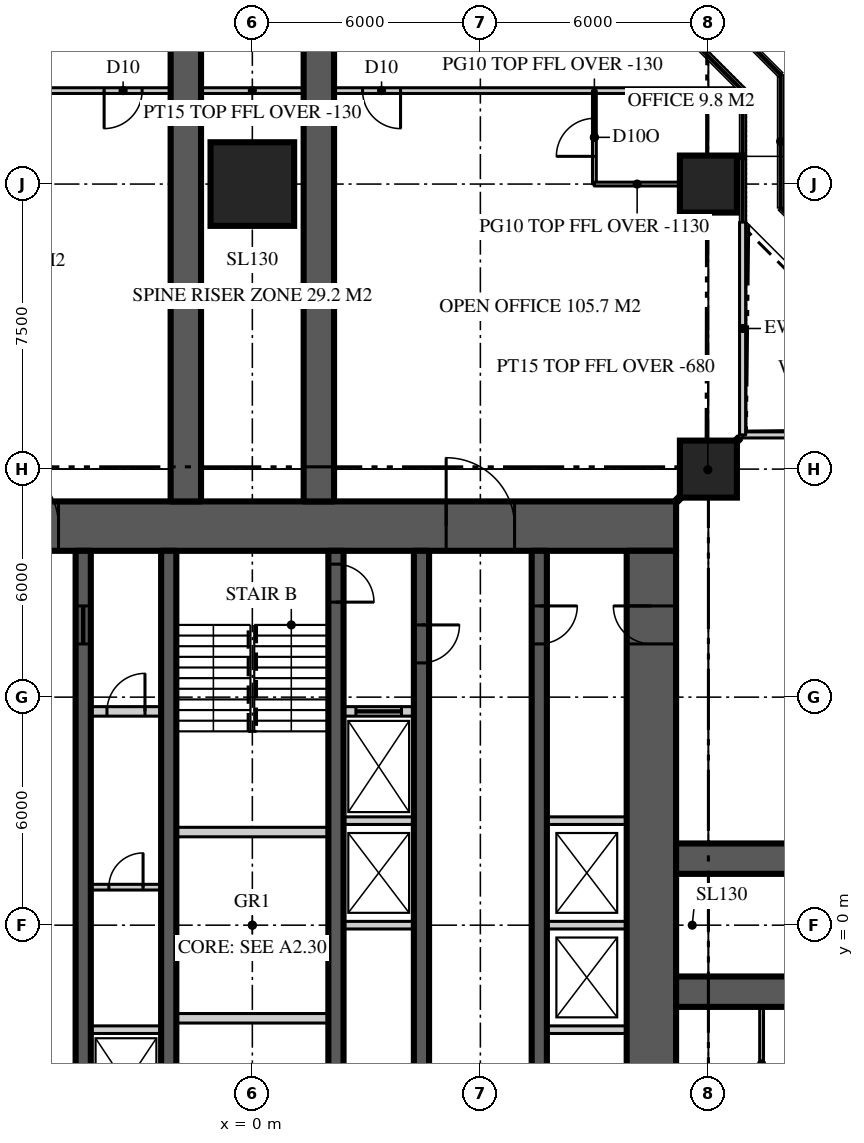
"""IFC4 building model, lengths in metres.
Left out: names, types, materials, properties, quantities, classifications, styles, units other than length and angle.
Written with IfcOpenShell. Run it as: python <this file> out.ifc"""

import sys

from ifc_helpers import new_model, si_unit, direction, frame, frame_2d, origin, origin_2d, place, context, subcontext, project, spatial, rectangle, extrude, element, fill, save


model = new_model("IFC4")
c1 = context("Model", 3, precision=1e-05, world=origin(), true_north=direction((0.0, 1.0)))
c2 = subcontext(c1, "Body", "Model", "MODEL_VIEW")
j1 = project(units=[si_unit("LENGTHUNIT", "METRE"), si_unit("PLANEANGLEUNIT", "RADIAN")], contexts=[c1])
p1 = place(None, origin())
s1 = spatial("IfcSite", under=j1, at=p1, CompositionType="ELEMENT")
p2 = place(p1, origin())
s2 = spatial("IfcBuilding", under=s1, at=p2, CompositionType="ELEMENT")
p3 = place(p2, frame((0.0, 0.0, 224.4)))
s3 = spatial("IfcBuildingStorey", under=s2, at=p3, CompositionType="ELEMENT", Elevation=224.4)
p4 = place(p3, frame((-11.15, 10.5, 0.0), z_axis=(0.0, 0.0, 1.0), x_axis=(1.0, 0.0, 0.0)))
e1 = element("IfcWall", 1, at=p4, inside=s3, PredefinedType="SHEAR", context=c2, shape_type="SweptSolid", body=[
    extrude(rectangle(XDim=22.3, YDim=1.3, at=frame_2d((11.15, 0.0))), origin(), (0.0, 0.0, 1.0), 3.9),
])
p5 = place(p4, frame((4.25, 0.0, 0.0)))
e2 = element("IfcOpeningElement", 2, at=p5, cuts=e1, PredefinedType="OPENING", context=c2, shape_type="SweptSolid", body=[
    extrude(rectangle(XDim=1.8, YDim=2.2, at=frame_2d((0.9, 1.1))), frame((0.0, 0.66, 0.0), z_axis=(0.0, -1.0, 0.0), x_axis=(1.0, 0.0, 0.0)), (0.0, 0.0, 1.0), 1.32),
])
p6 = place(p4, frame((16.25, 0.0, 0.0)))
e3 = element("IfcOpeningElement", 3, at=p6, cuts=e1, PredefinedType="OPENING", context=c2, shape_type="SweptSolid", body=[
    extrude(rectangle(XDim=1.8, YDim=2.2, at=frame_2d((0.9, 1.1))), frame((0.0, 0.66, 0.0), z_axis=(0.0, -1.0, 0.0), x_axis=(1.0, 0.0, 0.0)), (0.0, 0.0, 1.0), 1.32),
])
p7 = place(p3, frame((10.5, -9.85, 0.0), z_axis=(0.0, 0.0, 1.0), x_axis=(0.0, 1.0, 0.0)))
e4 = element("IfcWall", 4, at=p7, inside=s3, PredefinedType="SHEAR", context=c2, shape_type="SweptSolid", body=[
    extrude(rectangle(XDim=19.7, YDim=1.3, at=frame_2d((9.85, 0.0))), origin(), (0.0, 0.0, 1.0), 3.9),
])
p8 = place(p7, frame((17.25, 0.0, 0.0)))
e5 = element("IfcOpeningElement", 5, at=p8, cuts=e4, PredefinedType="OPENING", context=c2, shape_type="SweptSolid", body=[
    extrude(rectangle(XDim=1.0, YDim=2.2, at=frame_2d((0.5, 1.1))), frame((0.0, 0.66, 0.0), z_axis=(0.0, -1.0, 0.0), x_axis=(1.0, 0.0, 0.0)), (0.0, 0.0, 1.0), 1.32),
])
for number, where, z_axis, x_axis in (
    (6, (11.15, -1.75, 0.0), (0.0, 0.0, 1.0), (1.0, 0.0, 0.0)),
    (7, (11.15, 1.75, 0.0), (0.0, 0.0, 1.0), (1.0, 0.0, 0.0)),
    (8, (1.75, 11.15, 0.0), (0.0, 0.0, 1.0), (0.0, 1.0, 0.0)),
    (9, (-1.75, 11.15, 0.0), (0.0, 0.0, 1.0), (0.0, 1.0, 0.0)),
):
    element("IfcWall", number, at=place(p3, frame(where, z_axis=z_axis, x_axis=x_axis)), inside=s3, PredefinedType="SHEAR", context=c2, shape_type="SweptSolid", body=[
        extrude(rectangle(XDim=15.25, YDim=0.8, at=frame_2d((7.625, 0.0))), origin(), (0.0, 0.0, 1.0), 3.9),
    ])
p9 = place(p3, frame((12.0, 12.0, 0.0), z_axis=(0.0, 0.0, 1.0), x_axis=(1.0, 0.0, 0.0)))
e10 = element("IfcColumn", 10, at=p9, inside=s3, PredefinedType="COLUMN", context=c2, shape_type="SweptSolid", body=[
    extrude(rectangle(XDim=1.5, YDim=1.5, at=origin_2d()), origin(), (0.0, 0.0, 1.0), 3.9),
])
p10 = place(p3, frame((0.0, 19.5, 0.0), z_axis=(0.0, 0.0, 1.0), x_axis=(1.0, 0.0, 0.0)))
e11 = element("IfcColumn", 11, at=p10, inside=s3, PredefinedType="COLUMN", context=c2, shape_type="SweptSolid", body=[
    extrude(rectangle(XDim=2.2, YDim=2.2, at=origin_2d()), origin(), (0.0, 0.0, 1.0), 3.9),
])
p11 = place(p3, frame((12.0, 19.5, 0.0), z_axis=(0.0, 0.0, 1.0), x_axis=(1.0, 0.0, 0.0)))
e12 = element("IfcColumn", 12, at=p11, inside=s3, PredefinedType="COLUMN", context=c2, shape_type="SweptSolid", body=[
    extrude(rectangle(XDim=1.5, YDim=1.5, at=origin_2d()), origin(), (0.0, 0.0, 1.0), 3.9),
])
p12 = place(p3, frame((18.5, 12.9, 0.0), z_axis=(0.0, 0.0, 1.0), x_axis=(-1.0, 0.0, 0.0)))
e13 = element("IfcWall", 13, at=p12, inside=s3, PredefinedType="SOLIDWALL", context=c2, shape_type="SweptSolid", body=[
    extrude(rectangle(XDim=5.6, YDim=0.16, at=frame_2d((2.8, 0.0))), origin(), (0.0, 0.0, 1.0), 3.77),
])
p13 = place(p12, frame((2.3, 0.0, 0.0)))
e14 = element("IfcOpeningElement", 14, at=p13, cuts=e13, PredefinedType="OPENING", context=c2, shape_type="SweptSolid", body=[
    extrude(rectangle(XDim=1.0, YDim=2.2, at=frame_2d((0.5, 1.1))), frame((0.0, 0.09, 0.0), z_axis=(0.0, -1.0, 0.0), x_axis=(1.0, 0.0, 0.0)), (0.0, 0.0, 1.0), 0.18),
])
p14 = place(p3, frame((12.9, 12.9, 0.0), z_axis=(0.0, 0.0, 1.0), x_axis=(0.0, 1.0, 0.0)))
e15 = element("IfcWall", 15, at=p14, inside=s3, PredefinedType="SOLIDWALL", context=c2, shape_type="SweptSolid", body=[
    extrude(rectangle(XDim=5.6, YDim=0.16, at=frame_2d((2.8, 0.0))), origin(), (0.0, 0.0, 1.0), 3.77),
])
p15 = place(p3, frame((7.55, 9.85, 0.0), z_axis=(0.0, 0.0, 1.0), x_axis=(0.0, -1.0, 0.0)))
e16 = element("IfcWall", 16, at=p15, inside=s3, PredefinedType="SHEAR", context=c2, shape_type="SweptSolid", body=[
    extrude(rectangle(XDim=19.7, YDim=0.4, at=frame_2d((9.85, 0.0))), origin(), (0.0, 0.0, 1.0), 3.9),
])
p16 = place(p15, frame((1.45, 0.0, 0.0)))
e17 = element("IfcOpeningElement", 17, at=p16, cuts=e16, PredefinedType="OPENING", context=c2, shape_type="SweptSolid", body=[
    extrude(rectangle(XDim=1.0, YDim=2.2, at=frame_2d((0.5, 1.1))), frame((0.0, 0.21, 0.0), z_axis=(0.0, -1.0, 0.0), x_axis=(1.0, 0.0, 0.0)), (0.0, 0.0, 1.0), 0.42),
])
p17 = place(p15, frame((17.3, 0.0, 0.0)))
e18 = element("IfcOpeningElement", 18, at=p17, cuts=e16, PredefinedType="OPENING", context=c2, shape_type="SweptSolid", body=[
    extrude(rectangle(XDim=0.9, YDim=2.1, at=frame_2d((0.45, 1.05))), frame((0.0, 0.21, 0.0), z_axis=(0.0, -1.0, 0.0), x_axis=(1.0, 0.0, 0.0)), (0.0, 0.0, 1.0), 0.42),
])
p18 = place(p3, frame((-4.45, -9.85, 0.0), z_axis=(0.0, 0.0, 1.0), x_axis=(0.0, 1.0, 0.0)))
e19 = element("IfcWall", 19, at=p18, inside=s3, PredefinedType="SHEAR", context=c2, shape_type="SweptSolid", body=[
    extrude(rectangle(XDim=19.7, YDim=0.4, at=frame_2d((9.85, 0.0))), origin(), (0.0, 0.0, 1.0), 3.9),
])
p19 = place(p18, frame((1.95, 0.0, 0.0)))
e20 = element("IfcOpeningElement", 20, at=p19, cuts=e19, PredefinedType="OPENING", context=c2, shape_type="SweptSolid", body=[
    extrude(rectangle(XDim=1.0, YDim=2.2, at=frame_2d((0.5, 1.1))), frame((0.0, 0.21, 0.0), z_axis=(0.0, -1.0, 0.0), x_axis=(1.0, 0.0, 0.0)), (0.0, 0.0, 1.0), 0.42),
])
p20 = place(p18, frame((17.25, 0.0, 0.0)))
e21 = element("IfcOpeningElement", 21, at=p20, cuts=e19, PredefinedType="OPENING", context=c2, shape_type="SweptSolid", body=[
    extrude(rectangle(XDim=1.0, YDim=2.1, at=frame_2d((0.5, 1.05))), frame((0.0, 0.21, 0.0), z_axis=(0.0, -1.0, 0.0), x_axis=(1.0, 0.0, 0.0)), (0.0, 0.0, 1.0), 0.42),
])
p21 = place(p3, frame((4.45, 9.85, 0.0), z_axis=(0.0, 0.0, 1.0), x_axis=(0.0, -1.0, 0.0)))
e22 = element("IfcWall", 22, at=p21, inside=s3, PredefinedType="SHEAR", context=c2, shape_type="SweptSolid", body=[
    extrude(rectangle(XDim=19.7, YDim=0.4, at=frame_2d((9.85, 0.0))), origin(), (0.0, 0.0, 1.0), 3.9),
])
p22 = place(p21, frame((1.95, 0.0, 0.0)))
e23 = element("IfcOpeningElement", 23, at=p22, cuts=e22, PredefinedType="OPENING", context=c2, shape_type="SweptSolid", body=[
    extrude(rectangle(XDim=1.0, YDim=2.2, at=frame_2d((0.5, 1.1))), frame((0.0, 0.21, 0.0), z_axis=(0.0, -1.0, 0.0), x_axis=(1.0, 0.0, 0.0)), (0.0, 0.0, 1.0), 0.42),
])
p23 = place(p21, frame((17.3, 0.0, 0.0)))
e24 = element("IfcOpeningElement", 24, at=p23, cuts=e22, PredefinedType="OPENING", context=c2, shape_type="SweptSolid", body=[
    extrude(rectangle(XDim=0.9, YDim=2.1, at=frame_2d((0.45, 1.05))), frame((0.0, 0.21, 0.0), z_axis=(0.0, -1.0, 0.0), x_axis=(1.0, 0.0, 0.0)), (0.0, 0.0, 1.0), 0.42),
])
p24 = place(p3, frame((-2.2, -9.85, 0.0), z_axis=(0.0, 0.0, 1.0), x_axis=(0.0, 1.0, 0.0)))
e25 = element("IfcWall", 25, at=p24, inside=s3, PredefinedType="SHEAR", context=c2, shape_type="SweptSolid", body=[
    extrude(rectangle(XDim=19.7, YDim=0.4, at=frame_2d((9.85, 0.0))), origin(), (0.0, 0.0, 1.0), 3.9),
])
p25 = place(p24, frame((0.35, 0.0, 0.0)))
e26 = element("IfcOpeningElement", 26, at=p25, cuts=e25, PredefinedType="OPENING", context=c2, shape_type="SweptSolid", body=[
    extrude(rectangle(XDim=1.0, YDim=2.2, at=frame_2d((0.5, 1.1))), frame((0.0, 0.21, 0.0), z_axis=(0.0, -1.0, 0.0), x_axis=(1.0, 0.0, 0.0)), (0.0, 0.0, 1.0), 0.42),
])
p26 = place(p3, frame((2.2, 9.85, 0.0), z_axis=(0.0, 0.0, 1.0), x_axis=(0.0, -1.0, 0.0)))
e27 = element("IfcWall", 27, at=p26, inside=s3, PredefinedType="SHEAR", context=c2, shape_type="SweptSolid", body=[
    extrude(rectangle(XDim=19.7, YDim=0.4, at=frame_2d((9.85, 0.0))), origin(), (0.0, 0.0, 1.0), 3.9),
])
p27 = place(p26, frame((0.35, 0.0, 0.0)))
e28 = element("IfcOpeningElement", 28, at=p27, cuts=e27, PredefinedType="OPENING", context=c2, shape_type="SweptSolid", body=[
    extrude(rectangle(XDim=1.0, YDim=2.2, at=frame_2d((0.5, 1.1))), frame((0.0, 0.21, 0.0), z_axis=(0.0, -1.0, 0.0), x_axis=(1.0, 0.0, 0.0)), (0.0, 0.0, 1.0), 0.42),
])
p28 = place(p3, frame((-4.25, 5.625, 0.0), z_axis=(0.0, 0.0, 1.0), x_axis=(1.0, 0.0, 0.0)))
e29 = element("IfcWall", 29, at=p28, inside=s3, PredefinedType="SOLIDWALL", context=c2, shape_type="SweptSolid", body=[
    extrude(rectangle(XDim=1.85, YDim=0.25, at=frame_2d((0.925, 0.0))), origin(), (0.0, 0.0, 1.0), 3.7),
])
p29 = place(p28, frame((0.425, 0.0, 0.0)))
e30 = element("IfcOpeningElement", 30, at=p29, cuts=e29, PredefinedType="OPENING", context=c2, shape_type="SweptSolid", body=[
    extrude(rectangle(XDim=1.0, YDim=2.2, at=frame_2d((0.5, 1.1))), frame((0.0, 0.135, 0.0), z_axis=(0.0, -1.0, 0.0), x_axis=(1.0, 0.0, 0.0)), (0.0, 0.0, 1.0), 0.27),
])
p30 = place(p3, frame((2.4, 5.625, 0.0), z_axis=(0.0, 0.0, 1.0), x_axis=(1.0, 0.0, 0.0)))
e31 = element("IfcWall", 31, at=p30, inside=s3, PredefinedType="SOLIDWALL", context=c2, shape_type="SweptSolid", body=[
    extrude(rectangle(XDim=1.85, YDim=0.25, at=frame_2d((0.925, 0.0))), origin(), (0.0, 0.0, 1.0), 3.7),
])
p31 = place(p30, frame((0.325, 0.0, 0.0)))
e32 = element("IfcOpeningElement", 32, at=p31, cuts=e31, PredefinedType="OPENING", context=c2, shape_type="SweptSolid", body=[
    extrude(rectangle(XDim=1.2, YDim=2.2, at=frame_2d((0.6, 1.1))), frame((0.0, 0.135, 0.0), z_axis=(0.0, -1.0, 0.0), x_axis=(1.0, 0.0, 0.0)), (0.0, 0.0, 1.0), 0.27),
])
for number, where, z_axis, x_axis in (
    (33, (-2.0, -2.45, 0.0), (0.0, 0.0, 1.0), (1.0, 0.0, 0.0)),
    (34, (-2.0, 2.45, 0.0), (0.0, 0.0, 1.0), (1.0, 0.0, 0.0)),
):
    element("IfcWall", number, at=place(p3, frame(where, z_axis=z_axis, x_axis=x_axis)), inside=s3, PredefinedType="SOLIDWALL", context=c2, shape_type="SweptSolid", body=[
        extrude(rectangle(XDim=4.0, YDim=0.25, at=frame_2d((2.0, 0.0))), origin(), (0.0, 0.0, 1.0), 3.7),
    ])
p32 = place(p3, frame((-4.25, -2.75, 0.0), z_axis=(0.0, 0.0, 1.0), x_axis=(1.0, 0.0, 0.0)))
e35 = element("IfcWall", 35, at=p32, inside=s3, PredefinedType="SOLIDWALL", context=c2, shape_type="SweptSolid", body=[
    extrude(rectangle(XDim=1.85, YDim=0.2, at=frame_2d((0.925, 0.0))), origin(), (0.0, 0.0, 1.0), 3.7),
])
p33 = place(p3, frame((7.75, -2.75, 0.0), z_axis=(0.0, 0.0, 1.0), x_axis=(1.0, 0.0, 0.0)))
e36 = element("IfcWall", 36, at=p33, inside=s3, PredefinedType="SOLIDWALL", context=c2, shape_type="SweptSolid", body=[
    extrude(rectangle(XDim=2.1, YDim=0.2, at=frame_2d((1.05, 0.0))), origin(), (0.0, 0.0, 1.0), 3.7),
])
p34 = place(p3, frame((2.4, 0.0, 0.0), z_axis=(0.0, 0.0, 1.0), x_axis=(1.0, 0.0, 0.0)))
e37 = element("IfcWall", 37, at=p34, inside=s3, PredefinedType="SOLIDWALL", context=c2, shape_type="SweptSolid", body=[
    extrude(rectangle(XDim=1.85, YDim=0.2, at=frame_2d((0.925, 0.0))), origin(), (0.0, 0.0, 1.0), 3.7),
])
p35 = place(p3, frame((7.75, 0.0, 0.0), z_axis=(0.0, 0.0, 1.0), x_axis=(1.0, 0.0, 0.0)))
e38 = element("IfcWall", 38, at=p35, inside=s3, PredefinedType="SOLIDWALL", context=c2, shape_type="SweptSolid", body=[
    extrude(rectangle(XDim=2.1, YDim=0.2, at=frame_2d((1.05, 0.0))), origin(), (0.0, 0.0, 1.0), 3.7),
])
p36 = place(p3, frame((2.4, 2.75, 0.0), z_axis=(0.0, 0.0, 1.0), x_axis=(1.0, 0.0, 0.0)))
e39 = element("IfcWall", 39, at=p36, inside=s3, PredefinedType="SOLIDWALL", context=c2, shape_type="SweptSolid", body=[
    extrude(rectangle(XDim=1.85, YDim=0.2, at=frame_2d((0.925, 0.0))), origin(), (0.0, 0.0, 1.0), 3.7),
])
p37 = place(p3, frame((7.75, 2.75, 0.0), z_axis=(0.0, 0.0, 1.0), x_axis=(1.0, 0.0, 0.0)))
e40 = element("IfcWall", 40, at=p37, inside=s3, PredefinedType="SOLIDWALL", context=c2, shape_type="SweptSolid", body=[
    extrude(rectangle(XDim=2.1, YDim=0.2, at=frame_2d((1.05, 0.0))), origin(), (0.0, 0.0, 1.0), 3.7),
])
p38 = place(p3, frame((13.4, -2.15, 0.0), z_axis=(0.0, 0.0, 1.0), x_axis=(0.0, -1.0, 0.0)))
e41 = element("IfcWall", 41, at=p38, inside=s3, PredefinedType="PARTITIONING", context=c2, shape_type="SweptSolid", body=[
    extrude(rectangle(XDim=3.0, YDim=0.1, at=frame_2d((1.5, 0.0))), origin(), (0.0, 0.0, 1.0), 3.77),
])
p39 = place(p3, frame((12.786, 21.959, 0.0), z_axis=(0.0, 0.0, 1.0), x_axis=(-1.0, 0.0, 0.0)))
e42 = element("IfcWall", 42, at=p39, inside=s3, PredefinedType="PARTITIONING", context=c2, shape_type="SweptSolid", body=[
    extrude(rectangle(XDim=25.573, YDim=0.15, at=frame_2d((12.786, 0.0))), origin(), (0.0, 0.0, 1.0), 3.77),
])
p40 = place(p39, frame((15.687, 0.0, 0.0)))
e43 = element("IfcOpeningElement", 43, at=p40, cuts=e42, PredefinedType="OPENING", context=c2, shape_type="SweptSolid", body=[
    extrude(rectangle(XDim=1.0, YDim=2.2, at=frame_2d((0.5, 1.1))), frame((0.0, 0.085, 0.0), z_axis=(0.0, -1.0, 0.0), x_axis=(1.0, 0.0, 0.0)), (0.0, 0.0, 1.0), 0.17),
])
p41 = place(p39, frame((8.886, 0.0, 0.0)))
e44 = element("IfcOpeningElement", 44, at=p41, cuts=e42, PredefinedType="OPENING", context=c2, shape_type="SweptSolid", body=[
    extrude(rectangle(XDim=1.0, YDim=2.2, at=frame_2d((0.5, 1.1))), frame((0.0, 0.085, 0.0), z_axis=(0.0, -1.0, 0.0), x_axis=(1.0, 0.0, 0.0)), (0.0, 0.0, 1.0), 0.17),
])
p42 = place(p3, frame((9.0, 19.5, 0.0), z_axis=(0.0, 0.0, 1.0), x_axis=(0.0, 1.0, 0.0)))
e45 = element("IfcWall", 45, at=p42, inside=s3, PredefinedType="PARTITIONING", context=c2, shape_type="SweptSolid", body=[
    extrude(rectangle(XDim=2.459, YDim=0.1, at=frame_2d((1.229, 0.0))), origin(), (0.0, 0.0, 1.0), 3.77),
])
p43 = place(p42, frame((0.729, 0.0, 0.0)))
e46 = element("IfcOpeningElement", 46, at=p43, cuts=e45, PredefinedType="OPENING", context=c2, shape_type="SweptSolid", body=[
    extrude(rectangle(XDim=1.0, YDim=2.2, at=frame_2d((0.5, 1.1))), frame((0.0, 0.06, 0.0), z_axis=(0.0, -1.0, 0.0), x_axis=(1.0, 0.0, 0.0)), (0.0, 0.0, 1.0), 0.12),
])
p44 = place(p3, frame((9.0, 19.5, 0.0), z_axis=(0.0, 0.0, 1.0), x_axis=(1.0, 0.0, 0.0)))
e47 = element("IfcWall", 47, at=p44, inside=s3, PredefinedType="PARTITIONING", context=c2, shape_type="SweptSolid", body=[
    extrude(rectangle(XDim=2.25, YDim=0.1, at=frame_2d((1.125, 0.0))), origin(), (0.0, 0.0, 1.0), 2.77),
])
p45 = place(p3, frame((11.15, 11.15, 0.0), z_axis=(0.0, 0.0, 1.0), x_axis=(0.707106781187, 0.707106781187, 0.0)))
e48 = element("IfcWall", 48, at=p45, inside=s3, PredefinedType="PARTITIONING", context=c2, shape_type="SweptSolid", body=[
    extrude(rectangle(XDim=2.362, YDim=0.15, at=frame_2d((1.181, 0.0))), origin(), (0.0, 0.0, 1.0), 3.22),
])
p46 = place(p3, frame((-4.25, 1.0, 0.0), z_axis=(0.0, 0.0, 1.0), x_axis=(1.0, 0.0, 0.0)))
e49 = element("IfcWall", 49, at=p46, inside=s3, PredefinedType="SOLIDWALL", context=c2, shape_type="SweptSolid", body=[
    extrude(rectangle(XDim=1.85, YDim=0.15, at=frame_2d((0.925, 0.0))), origin(), (0.0, 0.0, 1.0), 3.77),
])
p47 = place(p46, frame((0.475, 0.0, 0.0)))
e50 = element("IfcOpeningElement", 50, at=p47, cuts=e49, PredefinedType="OPENING", context=c2, shape_type="SweptSolid", body=[
    extrude(rectangle(XDim=0.9, YDim=2.1, at=frame_2d((0.45, 1.05))), frame((0.0, 0.085, 0.0), z_axis=(0.0, -1.0, 0.0), x_axis=(1.0, 0.0, 0.0)), (0.0, 0.0, 1.0), 0.17),
])
p48 = place(p5, origin())
e51 = element("IfcDoor", 51, at=p48, inside=s3, OperationType="DOUBLE_DOOR_DOUBLE_SWING", PredefinedType="DOOR", context=c2, shape_type="SweptSolid", body=[
    extrude(rectangle(XDim=1.8, YDim=2.2, at=frame_2d((0.9, 1.1))), frame((0.0, 0.025, 0.0), z_axis=(0.0, -1.0, 0.0), x_axis=(1.0, 0.0, 0.0)), (0.0, 0.0, 1.0), 0.05),
])
fill(e2, e51)
p49 = place(p6, origin())
e52 = element("IfcDoor", 52, at=p49, inside=s3, OperationType="DOUBLE_DOOR_DOUBLE_SWING", PredefinedType="DOOR", context=c2, shape_type="SweptSolid", body=[
    extrude(rectangle(XDim=1.8, YDim=2.2, at=frame_2d((0.9, 1.1))), frame((0.0, 0.025, 0.0), z_axis=(0.0, -1.0, 0.0), x_axis=(1.0, 0.0, 0.0)), (0.0, 0.0, 1.0), 0.05),
])
fill(e3, e52)
p50 = place(p16, origin())
e53 = element("IfcDoor", 53, at=p50, inside=s3, OperationType="SINGLE_SWING_LEFT", PredefinedType="DOOR", context=c2, shape_type="SweptSolid", body=[
    extrude(rectangle(XDim=1.0, YDim=2.2, at=frame_2d((0.5, 1.1))), frame((0.0, 0.025, 0.0), z_axis=(0.0, -1.0, 0.0), x_axis=(1.0, 0.0, 0.0)), (0.0, 0.0, 1.0), 0.05),
])
fill(e17, e53)
p51 = place(p8, origin())
e54 = element("IfcDoor", 54, at=p51, inside=s3, OperationType="SINGLE_SWING_RIGHT", PredefinedType="DOOR", context=c2, shape_type="SweptSolid", body=[
    extrude(rectangle(XDim=1.0, YDim=2.2, at=frame_2d((0.5, 1.1))), frame((0.0, 0.025, 0.0), z_axis=(0.0, -1.0, 0.0), x_axis=(1.0, 0.0, 0.0)), (0.0, 0.0, 1.0), 0.05),
])
fill(e5, e54)
p52 = place(p22, origin())
e55 = element("IfcDoor", 55, at=p52, inside=s3, OperationType="SINGLE_SWING_LEFT", PredefinedType="DOOR", context=c2, shape_type="SweptSolid", body=[
    extrude(rectangle(XDim=1.0, YDim=2.2, at=frame_2d((0.5, 1.1))), frame((0.0, 0.025, 0.0), z_axis=(0.0, -1.0, 0.0), x_axis=(1.0, 0.0, 0.0)), (0.0, 0.0, 1.0), 0.05),
])
fill(e23, e55)
p53 = place(p27, origin())
e56 = element("IfcDoor", 56, at=p53, inside=s3, OperationType="SINGLE_SWING_RIGHT", PredefinedType="DOOR", context=c2, shape_type="SweptSolid", body=[
    extrude(rectangle(XDim=1.0, YDim=2.2, at=frame_2d((0.5, 1.1))), frame((0.0, 0.025, 0.0), z_axis=(0.0, -1.0, 0.0), x_axis=(1.0, 0.0, 0.0)), (0.0, 0.0, 1.0), 0.05),
])
fill(e28, e56)
p54 = place(p20, origin())
e57 = element("IfcDoor", 57, at=p54, inside=s3, OperationType="SLIDING_TO_LEFT", PredefinedType="DOOR", context=c2, shape_type="SweptSolid", body=[
    extrude(rectangle(XDim=1.0, YDim=2.1, at=frame_2d((0.5, 1.05))), frame((0.0, 0.025, 0.0), z_axis=(0.0, -1.0, 0.0), x_axis=(1.0, 0.0, 0.0)), (0.0, 0.0, 1.0), 0.05),
])
fill(e21, e57)
p55 = place(p31, origin())
e58 = element("IfcDoor", 58, at=p55, inside=s3, OperationType="SLIDING_TO_LEFT", PredefinedType="DOOR", context=c2, shape_type="SweptSolid", body=[
    extrude(rectangle(XDim=1.2, YDim=2.2, at=frame_2d((0.6, 1.1))), frame((0.0, 0.025, 0.0), z_axis=(0.0, -1.0, 0.0), x_axis=(1.0, 0.0, 0.0)), (0.0, 0.0, 1.0), 0.05),
])
fill(e32, e58)
p56 = place(p40, origin())
e59 = element("IfcDoor", 59, at=p56, inside=s3, OperationType="SINGLE_SWING_RIGHT", PredefinedType="DOOR", context=c2, shape_type="SweptSolid", body=[
    extrude(rectangle(XDim=1.0, YDim=2.2, at=frame_2d((0.5, 1.1))), frame((0.0, 0.025, 0.0), z_axis=(0.0, -1.0, 0.0), x_axis=(1.0, 0.0, 0.0)), (0.0, 0.0, 1.0), 0.05),
])
fill(e43, e59)
p57 = place(p41, origin())
e60 = element("IfcDoor", 60, at=p57, inside=s3, OperationType="SINGLE_SWING_LEFT", PredefinedType="DOOR", context=c2, shape_type="SweptSolid", body=[
    extrude(rectangle(XDim=1.0, YDim=2.2, at=frame_2d((0.5, 1.1))), frame((0.0, 0.025, 0.0), z_axis=(0.0, -1.0, 0.0), x_axis=(1.0, 0.0, 0.0)), (0.0, 0.0, 1.0), 0.05),
])
fill(e44, e60)
p58 = place(p43, origin())
e61 = element("IfcDoor", 61, at=p58, inside=s3, OperationType="SINGLE_SWING_LEFT", PredefinedType="DOOR", context=c2, shape_type="SweptSolid", body=[
    extrude(rectangle(XDim=1.0, YDim=2.2, at=frame_2d((0.5, 1.1))), frame((0.0, 0.025, 0.0), z_axis=(0.0, -1.0, 0.0), x_axis=(1.0, 0.0, 0.0)), (0.0, 0.0, 1.0), 0.05),
])
fill(e46, e61)
p59 = place(p47, origin())
e62 = element("IfcDoor", 62, at=p59, inside=s3, OperationType="SINGLE_SWING_RIGHT", PredefinedType="DOOR", context=c2, shape_type="SweptSolid", body=[
    extrude(rectangle(XDim=0.9, YDim=2.1, at=frame_2d((0.45, 1.05))), frame((0.0, 0.025, 0.0), z_axis=(0.0, -1.0, 0.0), x_axis=(1.0, 0.0, 0.0)), (0.0, 0.0, 1.0), 0.05),
])
fill(e50, e62)
p60 = place(p29, origin())
e63 = element("IfcDoor", 63, at=p60, inside=s3, OperationType="SINGLE_SWING_RIGHT", PredefinedType="DOOR", context=c2, shape_type="SweptSolid", body=[
    extrude(rectangle(XDim=1.0, YDim=2.2, at=frame_2d((0.5, 1.1))), frame((0.0, 0.025, 0.0), z_axis=(0.0, -1.0, 0.0), x_axis=(1.0, 0.0, 0.0)), (0.0, 0.0, 1.0), 0.05),
])
fill(e30, e63)
save(model, sys.argv[1])
